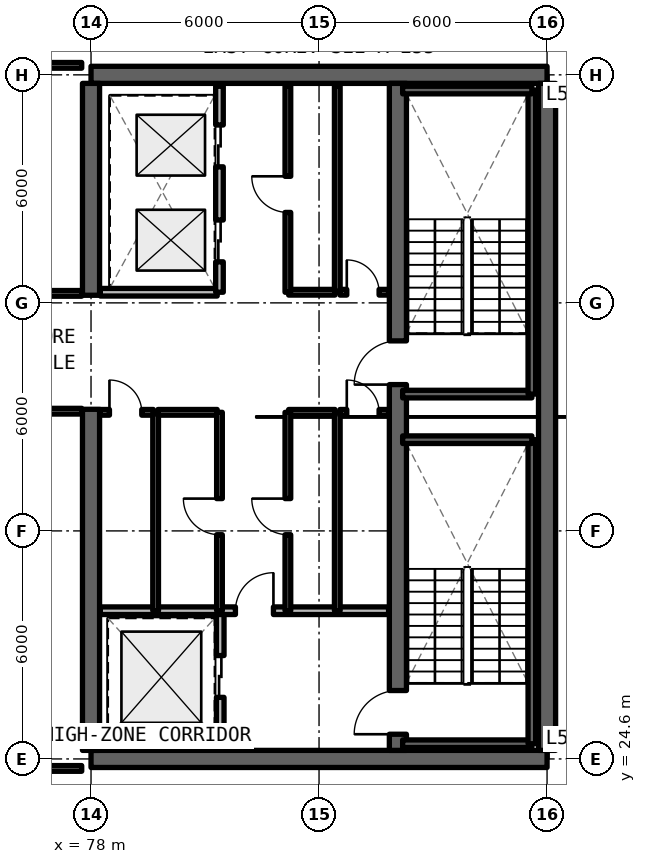
"""IFC4 building model, lengths in metres.
Left out: names, types, materials, properties, quantities, classifications, styles, units other than length and angle.
Written with IfcOpenShell. Run it as: python <this file> out.ifc"""

import sys

from ifc_helpers import new_model, si_unit, direction, frame, frame_2d, origin, place, context, subcontext, project, spatial, rectangle, extrude, element, fill, save


model = new_model("IFC4")
c1 = context("Model", 3, precision=1e-05, world=origin(), true_north=direction((0.0, 1.0)))
c2 = subcontext(c1, "Body", "Model", "MODEL_VIEW")
j1 = project(units=[si_unit("LENGTHUNIT", "METRE"), si_unit("PLANEANGLEUNIT", "RADIAN")], contexts=[c1])
p1 = place(None, origin())
s1 = spatial("IfcSite", under=j1, at=p1, CompositionType="ELEMENT")
p2 = place(p1, origin())
s2 = spatial("IfcBuilding", under=s1, at=p2, CompositionType="ELEMENT")
p3 = place(p2, frame((0.0, 0.0, 211.86)))
s3 = spatial("IfcBuildingStorey", under=s2, at=p3, CompositionType="ELEMENT", Elevation=211.86)
for number, where, z_axis, x_axis in (
    (1, (78.0, 24.6, 0.0), (0.0, 0.0, 1.0), (1.0, 0.0, 0.0)),
    (2, (90.0, 42.6, 0.0), (0.0, 0.0, 1.0), (-1.0, 0.0, 0.0)),
):
    element("IfcWall", number, at=place(p3, frame(where, z_axis=z_axis, x_axis=x_axis)), inside=s3, PredefinedType="SHEAR", context=c2, shape_type="SweptSolid", body=[
        extrude(rectangle(XDim=12.0, YDim=0.45, at=frame_2d((6.0, 0.0))), origin(), (0.0, 0.0, 1.0), 3.63),
    ])
p4 = place(p3, frame((90.0, 24.825, 0.0), z_axis=(0.0, 0.0, 1.0), x_axis=(0.0, 1.0, 0.0)))
e3 = element("IfcWall", 3, at=p4, inside=s3, PredefinedType="SHEAR", context=c2, shape_type="SweptSolid", body=[
    extrude(rectangle(XDim=17.55, YDim=0.45, at=frame_2d((8.775, 0.0))), origin(), (0.0, 0.0, 1.0), 3.63),
])
p5 = place(p3, frame((78.0, 24.825, 0.0), z_axis=(0.0, 0.0, 1.0), x_axis=(0.0, 1.0, 0.0)))
e4 = element("IfcWall", 4, at=p5, inside=s3, PredefinedType="SHEAR", context=c2, shape_type="SweptSolid", body=[
    extrude(rectangle(XDim=8.975, YDim=0.45, at=frame_2d((4.488, 0.0))), origin(), (0.0, 0.0, 1.0), 3.63),
])
p6 = place(p3, frame((78.0, 36.8, 0.0), z_axis=(0.0, 0.0, 1.0), x_axis=(0.0, 1.0, 0.0)))
e5 = element("IfcWall", 5, at=p6, inside=s3, PredefinedType="SHEAR", context=c2, shape_type="SweptSolid", body=[
    extrude(rectangle(XDim=5.575, YDim=0.45, at=frame_2d((2.788, 0.0))), origin(), (0.0, 0.0, 1.0), 3.63),
])
p7 = place(p3, frame((86.075, 24.825, 0.0), z_axis=(0.0, 0.0, 1.0), x_axis=(0.0, 1.0, 0.0)))
e6 = element("IfcWall", 6, at=p7, inside=s3, PredefinedType="SHEAR", context=c2, shape_type="SweptSolid", body=[
    extrude(rectangle(XDim=17.55, YDim=0.45, at=frame_2d((8.775, 0.0))), origin(), (0.0, 0.0, 1.0), 3.63),
])
p8 = place(p7, frame((0.425, 0.0, 0.0)))
e7 = element("IfcOpeningElement", 7, at=p8, cuts=e6, PredefinedType="OPENING", context=c2, shape_type="SweptSolid", body=[
    extrude(rectangle(XDim=1.15, YDim=2.15, at=frame_2d((0.575, 1.075))), frame((0.0, 0.235, 0.0), z_axis=(0.0, -1.0, 0.0), x_axis=(1.0, 0.0, 0.0)), (0.0, 0.0, 1.0), 0.47),
])
p9 = place(p7, frame((9.625, 0.0, 0.0)))
e8 = element("IfcOpeningElement", 8, at=p9, cuts=e6, PredefinedType="OPENING", context=c2, shape_type="SweptSolid", body=[
    extrude(rectangle(XDim=1.15, YDim=2.15, at=frame_2d((0.575, 1.075))), frame((0.0, 0.235, 0.0), z_axis=(0.0, -1.0, 0.0), x_axis=(1.0, 0.0, 0.0)), (0.0, 0.0, 1.0), 0.47),
])
p10 = place(p3, frame((81.4, 24.92, 0.0), z_axis=(0.0, 0.0, 1.0), x_axis=(0.0, 1.0, 0.0)))
e9 = element("IfcWall", 9, at=p10, inside=s3, PredefinedType="SOLIDWALL", context=c2, shape_type="SweptSolid", body=[
    extrude(rectangle(XDim=3.58, YDim=0.2, at=frame_2d((1.79, 0.0))), origin(), (0.0, 0.0, 1.0), 2.63),
])
p11 = place(p10, frame((1.3, 0.0, 0.0)))
e10 = element("IfcOpeningElement", 10, at=p11, cuts=e9, PredefinedType="OPENING", context=c2, shape_type="SweptSolid", body=[
    extrude(rectangle(XDim=1.1, YDim=2.2, at=frame_2d((0.55, 1.1))), frame((0.0, 0.11, 0.0), z_axis=(0.0, -1.0, 0.0), x_axis=(1.0, 0.0, 0.0)), (0.0, 0.0, 1.0), 0.22),
])
p12 = place(p3, frame((78.245, 28.5, 0.0), z_axis=(0.0, 0.0, 1.0), x_axis=(1.0, 0.0, 0.0)))
e11 = element("IfcWall", 11, at=p12, inside=s3, PredefinedType="SOLIDWALL", context=c2, shape_type="SweptSolid", body=[
    extrude(rectangle(XDim=7.585, YDim=0.2, at=frame_2d((3.792, 0.0))), origin(), (0.0, 0.0, 1.0), 2.63),
])
p13 = place(p12, frame((3.555, 0.0, 0.0)))
e12 = element("IfcOpeningElement", 12, at=p13, cuts=e11, PredefinedType="OPENING", context=c2, shape_type="SweptSolid", body=[
    extrude(rectangle(XDim=1.0, YDim=2.15, at=frame_2d((0.5, 1.075))), frame((0.0, 0.11, 0.0), z_axis=(0.0, -1.0, 0.0), x_axis=(1.0, 0.0, 0.0)), (0.0, 0.0, 1.0), 0.22),
])
p14 = place(p3, frame((84.48, 28.5, 0.0), z_axis=(0.0, 0.0, 1.0), x_axis=(0.0, 1.0, 0.0)))
e13 = element("IfcWall", 13, at=p14, inside=s3, PredefinedType="SOLIDWALL", context=c2, shape_type="SweptSolid", body=[
    extrude(rectangle(XDim=5.22, YDim=0.15, at=frame_2d((2.61, 0.0))), origin(), (0.0, 0.0, 1.0), 2.63),
])
p15 = place(p3, frame((84.55, 33.72, 0.0), z_axis=(0.0, 0.0, 1.0), x_axis=(1.0, 0.0, 0.0)))
e14 = element("IfcWall", 14, at=p15, inside=s3, PredefinedType="SOLIDWALL", context=c2, shape_type="SweptSolid", body=[
    extrude(rectangle(XDim=1.28, YDim=0.15, at=frame_2d((0.64, 0.0))), origin(), (0.0, 0.0, 1.0), 2.63),
])
p16 = place(p15, frame((0.18, 0.0, 0.0)))
e15 = element("IfcOpeningElement", 15, at=p16, cuts=e14, PredefinedType="OPENING", context=c2, shape_type="SweptSolid", body=[
    extrude(rectangle(XDim=0.85, YDim=2.1, at=frame_2d((0.425, 1.05))), frame((0.0, 0.085, 0.0), z_axis=(0.0, -1.0, 0.0), x_axis=(1.0, 0.0, 0.0)), (0.0, 0.0, 1.0), 0.17),
])
p17 = place(p3, frame((83.2, 33.72, 0.0), z_axis=(0.0, 0.0, 1.0), x_axis=(1.0, 0.0, 0.0)))
e16 = element("IfcWall", 16, at=p17, inside=s3, PredefinedType="SOLIDWALL", context=c2, shape_type="SweptSolid", body=[
    extrude(rectangle(XDim=1.22, YDim=0.15, at=frame_2d((0.61, 0.0))), origin(), (0.0, 0.0, 1.0), 2.63),
])
p18 = place(p3, frame((83.18, 28.5, 0.0), z_axis=(0.0, 0.0, 1.0), x_axis=(0.0, 1.0, 0.0)))
e17 = element("IfcWall", 17, at=p18, inside=s3, PredefinedType="SOLIDWALL", context=c2, shape_type="SweptSolid", body=[
    extrude(rectangle(XDim=5.22, YDim=0.15, at=frame_2d((2.61, 0.0))), origin(), (0.0, 0.0, 1.0), 2.63),
])
p19 = place(p18, frame((2.0, 0.0, 0.0)))
e18 = element("IfcOpeningElement", 18, at=p19, cuts=e17, PredefinedType="OPENING", context=c2, shape_type="SweptSolid", body=[
    extrude(rectangle(XDim=0.95, YDim=2.15, at=frame_2d((0.475, 1.075))), frame((0.0, 0.085, 0.0), z_axis=(0.0, -1.0, 0.0), x_axis=(1.0, 0.0, 0.0)), (0.0, 0.0, 1.0), 0.17),
])
p20 = place(p3, frame((79.7, 28.5, 0.0), z_axis=(0.0, 0.0, 1.0), x_axis=(0.0, 1.0, 0.0)))
e19 = element("IfcWall", 19, at=p20, inside=s3, PredefinedType="SOLIDWALL", context=c2, shape_type="SweptSolid", body=[
    extrude(rectangle(XDim=5.22, YDim=0.15, at=frame_2d((2.61, 0.0))), origin(), (0.0, 0.0, 1.0), 2.63),
])
p21 = place(p3, frame((79.76, 33.72, 0.0), z_axis=(0.0, 0.0, 1.0), x_axis=(1.0, 0.0, 0.0)))
e20 = element("IfcWall", 20, at=p21, inside=s3, PredefinedType="SOLIDWALL", context=c2, shape_type="SweptSolid", body=[
    extrude(rectangle(XDim=1.56, YDim=0.15, at=frame_2d((0.78, 0.0))), origin(), (0.0, 0.0, 1.0), 2.63),
])
p22 = place(p3, frame((78.245, 33.72, 0.0), z_axis=(0.0, 0.0, 1.0), x_axis=(1.0, 0.0, 0.0)))
e21 = element("IfcWall", 21, at=p22, inside=s3, PredefinedType="SOLIDWALL", context=c2, shape_type="SweptSolid", body=[
    extrude(rectangle(XDim=1.395, YDim=0.15, at=frame_2d((0.697, 0.0))), origin(), (0.0, 0.0, 1.0), 2.63),
])
p23 = place(p22, frame((0.24, 0.0, 0.0)))
e22 = element("IfcOpeningElement", 22, at=p23, cuts=e21, PredefinedType="OPENING", context=c2, shape_type="SweptSolid", body=[
    extrude(rectangle(XDim=0.85, YDim=2.1, at=frame_2d((0.425, 1.05))), frame((0.0, 0.085, 0.0), z_axis=(0.0, -1.0, 0.0), x_axis=(1.0, 0.0, 0.0)), (0.0, 0.0, 1.0), 0.17),
])
p24 = place(p3, frame((81.38, 28.5, 0.0), z_axis=(0.0, 0.0, 1.0), x_axis=(0.0, 1.0, 0.0)))
e23 = element("IfcWall", 23, at=p24, inside=s3, PredefinedType="SOLIDWALL", context=c2, shape_type="SweptSolid", body=[
    extrude(rectangle(XDim=5.22, YDim=0.15, at=frame_2d((2.61, 0.0))), origin(), (0.0, 0.0, 1.0), 2.63),
])
p25 = place(p24, frame((2.0, 0.0, 0.0)))
e24 = element("IfcOpeningElement", 24, at=p25, cuts=e23, PredefinedType="OPENING", context=c2, shape_type="SweptSolid", body=[
    extrude(rectangle(XDim=0.95, YDim=2.15, at=frame_2d((0.475, 1.075))), frame((0.0, 0.085, 0.0), z_axis=(0.0, -1.0, 0.0), x_axis=(1.0, 0.0, 0.0)), (0.0, 0.0, 1.0), 0.17),
])
p26 = place(p3, frame((84.48, 36.88, 0.0), z_axis=(0.0, 0.0, 1.0), x_axis=(0.0, 1.0, 0.0)))
e25 = element("IfcWall", 25, at=p26, inside=s3, PredefinedType="SOLIDWALL", context=c2, shape_type="SweptSolid", body=[
    extrude(rectangle(XDim=5.42, YDim=0.15, at=frame_2d((2.71, 0.0))), origin(), (0.0, 0.0, 1.0), 2.63),
])
p27 = place(p3, frame((84.55, 36.88, 0.0), z_axis=(0.0, 0.0, 1.0), x_axis=(1.0, 0.0, 0.0)))
e26 = element("IfcWall", 26, at=p27, inside=s3, PredefinedType="SOLIDWALL", context=c2, shape_type="SweptSolid", body=[
    extrude(rectangle(XDim=1.28, YDim=0.15, at=frame_2d((0.64, 0.0))), origin(), (0.0, 0.0, 1.0), 2.63),
])
p28 = place(p27, frame((0.18, 0.0, 0.0)))
e27 = element("IfcOpeningElement", 27, at=p28, cuts=e26, PredefinedType="OPENING", context=c2, shape_type="SweptSolid", body=[
    extrude(rectangle(XDim=0.85, YDim=2.1, at=frame_2d((0.425, 1.05))), frame((0.0, 0.085, 0.0), z_axis=(0.0, -1.0, 0.0), x_axis=(1.0, 0.0, 0.0)), (0.0, 0.0, 1.0), 0.17),
])
p29 = place(p3, frame((83.2, 36.88, 0.0), z_axis=(0.0, 0.0, 1.0), x_axis=(1.0, 0.0, 0.0)))
e28 = element("IfcWall", 28, at=p29, inside=s3, PredefinedType="SOLIDWALL", context=c2, shape_type="SweptSolid", body=[
    extrude(rectangle(XDim=1.22, YDim=0.15, at=frame_2d((0.61, 0.0))), origin(), (0.0, 0.0, 1.0), 2.63),
])
p30 = place(p3, frame((83.18, 36.88, 0.0), z_axis=(0.0, 0.0, 1.0), x_axis=(0.0, 1.0, 0.0)))
e29 = element("IfcWall", 29, at=p30, inside=s3, PredefinedType="SOLIDWALL", context=c2, shape_type="SweptSolid", body=[
    extrude(rectangle(XDim=5.42, YDim=0.15, at=frame_2d((2.71, 0.0))), origin(), (0.0, 0.0, 1.0), 2.63),
])
p31 = place(p30, frame((2.1, 0.0, 0.0)))
e30 = element("IfcOpeningElement", 30, at=p31, cuts=e29, PredefinedType="OPENING", context=c2, shape_type="SweptSolid", body=[
    extrude(rectangle(XDim=0.95, YDim=2.15, at=frame_2d((0.475, 1.075))), frame((0.0, 0.085, 0.0), z_axis=(0.0, -1.0, 0.0), x_axis=(1.0, 0.0, 0.0)), (0.0, 0.0, 1.0), 0.17),
])
p32 = place(p3, frame((78.245, 36.88, 0.0), z_axis=(0.0, 0.0, 1.0), x_axis=(1.0, 0.0, 0.0)))
e31 = element("IfcWall", 31, at=p32, inside=s3, PredefinedType="SOLIDWALL", context=c2, shape_type="SweptSolid", body=[
    extrude(rectangle(XDim=3.075, YDim=0.2, at=frame_2d((1.538, 0.0))), origin(), (0.0, 0.0, 1.0), 2.63),
])
p33 = place(p3, frame((81.38, 36.88, 0.0), z_axis=(0.0, 0.0, 1.0), x_axis=(0.0, 1.0, 0.0)))
e32 = element("IfcWall", 32, at=p33, inside=s3, PredefinedType="SOLIDWALL", context=c2, shape_type="SweptSolid", body=[
    extrude(rectangle(XDim=5.42, YDim=0.2, at=frame_2d((2.71, 0.0))), origin(), (0.0, 0.0, 1.0), 2.63),
])
p34 = place(p33, frame((0.8, 0.0, 0.0)))
e33 = element("IfcOpeningElement", 33, at=p34, cuts=e32, PredefinedType="OPENING", context=c2, shape_type="SweptSolid", body=[
    extrude(rectangle(XDim=1.1, YDim=2.2, at=frame_2d((0.55, 1.1))), frame((0.0, 0.11, 0.0), z_axis=(0.0, -1.0, 0.0), x_axis=(1.0, 0.0, 0.0)), (0.0, 0.0, 1.0), 0.22),
])
p35 = place(p33, frame((3.3, 0.0, 0.0)))
e34 = element("IfcOpeningElement", 34, at=p35, cuts=e32, PredefinedType="OPENING", context=c2, shape_type="SweptSolid", body=[
    extrude(rectangle(XDim=1.1, YDim=2.2, at=frame_2d((0.55, 1.1))), frame((0.0, 0.11, 0.0), z_axis=(0.0, -1.0, 0.0), x_axis=(1.0, 0.0, 0.0)), (0.0, 0.0, 1.0), 0.22),
])
p36 = place(p3, frame((69.85, 24.35, 0.0), z_axis=(0.0, 0.0, 1.0), x_axis=(1.0, 0.0, 0.0)))
e35 = element("IfcWall", 35, at=p36, inside=s3, PredefinedType="SOLIDWALL", context=c2, shape_type="SweptSolid", body=[
    extrude(rectangle(XDim=7.905, YDim=0.15, at=frame_2d((3.952, 0.0))), origin(), (0.0, 0.0, 1.0), 2.63),
])
p37 = place(p3, frame((69.85, 33.75, 0.0), z_axis=(0.0, 0.0, 1.0), x_axis=(1.0, 0.0, 0.0)))
e36 = element("IfcWall", 36, at=p37, inside=s3, PredefinedType="SOLIDWALL", context=c2, shape_type="SweptSolid", body=[
    extrude(rectangle(XDim=7.905, YDim=0.15, at=frame_2d((3.952, 0.0))), origin(), (0.0, 0.0, 1.0), 2.63),
])
p38 = place(p37, frame((3.478, 0.0, 0.0)))
e37 = element("IfcOpeningElement", 37, at=p38, cuts=e36, PredefinedType="OPENING", context=c2, shape_type="SweptSolid", body=[
    extrude(rectangle(XDim=0.95, YDim=2.15, at=frame_2d((0.475, 1.075))), frame((0.0, 0.085, 0.0), z_axis=(0.0, -1.0, 0.0), x_axis=(1.0, 0.0, 0.0)), (0.0, 0.0, 1.0), 0.17),
])
p39 = place(p3, frame((69.85, 36.85, 0.0), z_axis=(0.0, 0.0, 1.0), x_axis=(1.0, 0.0, 0.0)))
e38 = element("IfcWall", 38, at=p39, inside=s3, PredefinedType="SOLIDWALL", context=c2, shape_type="SweptSolid", body=[
    extrude(rectangle(XDim=7.905, YDim=0.15, at=frame_2d((3.952, 0.0))), origin(), (0.0, 0.0, 1.0), 2.63),
])
p40 = place(p39, frame((3.478, 0.0, 0.0)))
e39 = element("IfcOpeningElement", 39, at=p40, cuts=e38, PredefinedType="OPENING", context=c2, shape_type="SweptSolid", body=[
    extrude(rectangle(XDim=0.95, YDim=2.15, at=frame_2d((0.475, 1.075))), frame((0.0, 0.085, 0.0), z_axis=(0.0, -1.0, 0.0), x_axis=(1.0, 0.0, 0.0)), (0.0, 0.0, 1.0), 0.17),
])
p41 = place(p3, frame((69.85, 42.85, 0.0), z_axis=(0.0, 0.0, 1.0), x_axis=(1.0, 0.0, 0.0)))
e40 = element("IfcWall", 40, at=p41, inside=s3, PredefinedType="SOLIDWALL", context=c2, shape_type="SweptSolid", body=[
    extrude(rectangle(XDim=7.905, YDim=0.15, at=frame_2d((3.952, 0.0))), origin(), (0.0, 0.0, 1.0), 2.63),
])
p42 = place(p3, frame((86.2, 25.0, 0.0), z_axis=(0.0, 0.0, 1.0), x_axis=(1.0, 0.0, 0.0)))
e41 = element("IfcWall", 41, at=p42, inside=s3, PredefinedType="SOLIDWALL", context=c2, shape_type="SweptSolid", body=[
    extrude(rectangle(XDim=3.4, YDim=0.2, at=frame_2d((1.7, 0.0))), origin(), (0.0, 0.0, 1.0), 3.63),
])
p43 = place(p3, frame((89.6, 25.0, 0.0), z_axis=(0.0, 0.0, 1.0), x_axis=(0.0, 1.0, 0.0)))
e42 = element("IfcWall", 42, at=p43, inside=s3, PredefinedType="SOLIDWALL", context=c2, shape_type="SweptSolid", body=[
    extrude(rectangle(XDim=8.0, YDim=0.2, at=frame_2d((4.0, 0.0))), origin(), (0.0, 0.0, 1.0), 3.63),
])
for number, where, z_axis, x_axis in (
    (43, (89.6, 33.0, 0.0), (0.0, 0.0, 1.0), (-1.0, 0.0, 0.0)),
    (44, (86.2, 34.2, 0.0), (0.0, 0.0, 1.0), (1.0, 0.0, 0.0)),
):
    element("IfcWall", number, at=place(p3, frame(where, z_axis=z_axis, x_axis=x_axis)), inside=s3, PredefinedType="SOLIDWALL", context=c2, shape_type="SweptSolid", body=[
        extrude(rectangle(XDim=3.4, YDim=0.2, at=frame_2d((1.7, 0.0))), origin(), (0.0, 0.0, 1.0), 3.63),
    ])
p44 = place(p3, frame((89.6, 34.2, 0.0), z_axis=(0.0, 0.0, 1.0), x_axis=(0.0, 1.0, 0.0)))
e45 = element("IfcWall", 45, at=p44, inside=s3, PredefinedType="SOLIDWALL", context=c2, shape_type="SweptSolid", body=[
    extrude(rectangle(XDim=8.0, YDim=0.2, at=frame_2d((4.0, 0.0))), origin(), (0.0, 0.0, 1.0), 3.63),
])
p45 = place(p3, frame((89.6, 42.2, 0.0), z_axis=(0.0, 0.0, 1.0), x_axis=(-1.0, 0.0, 0.0)))
e46 = element("IfcWall", 46, at=p45, inside=s3, PredefinedType="SOLIDWALL", context=c2, shape_type="SweptSolid", body=[
    extrude(rectangle(XDim=3.4, YDim=0.2, at=frame_2d((1.7, 0.0))), origin(), (0.0, 0.0, 1.0), 3.63),
])
p46 = place(p11, origin())
e47 = element("IfcDoor", 47, at=p46, inside=s3, OperationType="SLIDING_TO_LEFT", PredefinedType="DOOR", context=c2, shape_type="SweptSolid", body=[
    extrude(rectangle(XDim=1.1, YDim=2.2, at=frame_2d((0.55, 1.1))), frame((0.0, 0.025, 0.0), z_axis=(0.0, -1.0, 0.0), x_axis=(1.0, 0.0, 0.0)), (0.0, 0.0, 1.0), 0.05),
])
fill(e10, e47)
p47 = place(p13, origin())
e48 = element("IfcDoor", 48, at=p47, inside=s3, OperationType="SINGLE_SWING_RIGHT", PredefinedType="DOOR", context=c2, shape_type="SweptSolid", body=[
    extrude(rectangle(XDim=1.0, YDim=2.15, at=frame_2d((0.5, 1.075))), frame((0.0, 0.025, 0.0), z_axis=(0.0, -1.0, 0.0), x_axis=(1.0, 0.0, 0.0)), (0.0, 0.0, 1.0), 0.05),
])
fill(e12, e48)
p48 = place(p16, origin())
e49 = element("IfcDoor", 49, at=p48, inside=s3, OperationType="SINGLE_SWING_LEFT", PredefinedType="DOOR", context=c2, shape_type="SweptSolid", body=[
    extrude(rectangle(XDim=0.85, YDim=2.1, at=frame_2d((0.425, 1.05))), frame((0.0, 0.025, 0.0), z_axis=(0.0, -1.0, 0.0), x_axis=(1.0, 0.0, 0.0)), (0.0, 0.0, 1.0), 0.05),
])
fill(e15, e49)
p49 = place(p19, origin())
e50 = element("IfcDoor", 50, at=p49, inside=s3, OperationType="SINGLE_SWING_RIGHT", PredefinedType="DOOR", context=c2, shape_type="SweptSolid", body=[
    extrude(rectangle(XDim=0.95, YDim=2.15, at=frame_2d((0.475, 1.075))), frame((0.0, 0.025, 0.0), z_axis=(0.0, -1.0, 0.0), x_axis=(1.0, 0.0, 0.0)), (0.0, 0.0, 1.0), 0.05),
])
fill(e18, e50)
p50 = place(p23, origin())
e51 = element("IfcDoor", 51, at=p50, inside=s3, OperationType="SINGLE_SWING_LEFT", PredefinedType="DOOR", context=c2, shape_type="SweptSolid", body=[
    extrude(rectangle(XDim=0.85, YDim=2.1, at=frame_2d((0.425, 1.05))), frame((0.0, 0.025, 0.0), z_axis=(0.0, -1.0, 0.0), x_axis=(1.0, 0.0, 0.0)), (0.0, 0.0, 1.0), 0.05),
])
fill(e22, e51)
p51 = place(p25, origin())
e52 = element("IfcDoor", 52, at=p51, inside=s3, OperationType="SINGLE_SWING_RIGHT", PredefinedType="DOOR", context=c2, shape_type="SweptSolid", body=[
    extrude(rectangle(XDim=0.95, YDim=2.15, at=frame_2d((0.475, 1.075))), frame((0.0, 0.025, 0.0), z_axis=(0.0, -1.0, 0.0), x_axis=(1.0, 0.0, 0.0)), (0.0, 0.0, 1.0), 0.05),
])
fill(e24, e52)
p52 = place(p28, origin())
e53 = element("IfcDoor", 53, at=p52, inside=s3, OperationType="SINGLE_SWING_LEFT", PredefinedType="DOOR", context=c2, shape_type="SweptSolid", body=[
    extrude(rectangle(XDim=0.85, YDim=2.1, at=frame_2d((0.425, 1.05))), frame((0.0, 0.025, 0.0), z_axis=(0.0, -1.0, 0.0), x_axis=(1.0, 0.0, 0.0)), (0.0, 0.0, 1.0), 0.05),
])
fill(e27, e53)
p53 = place(p31, origin())
e54 = element("IfcDoor", 54, at=p53, inside=s3, OperationType="SINGLE_SWING_RIGHT", PredefinedType="DOOR", context=c2, shape_type="SweptSolid", body=[
    extrude(rectangle(XDim=0.95, YDim=2.15, at=frame_2d((0.475, 1.075))), frame((0.0, 0.025, 0.0), z_axis=(0.0, -1.0, 0.0), x_axis=(1.0, 0.0, 0.0)), (0.0, 0.0, 1.0), 0.05),
])
fill(e30, e54)
p54 = place(p34, origin())
e55 = element("IfcDoor", 55, at=p54, inside=s3, OperationType="SLIDING_TO_LEFT", PredefinedType="DOOR", context=c2, shape_type="SweptSolid", body=[
    extrude(rectangle(XDim=1.1, YDim=2.2, at=frame_2d((0.55, 1.1))), frame((0.0, 0.025, 0.0), z_axis=(0.0, -1.0, 0.0), x_axis=(1.0, 0.0, 0.0)), (0.0, 0.0, 1.0), 0.05),
])
fill(e33, e55)
p55 = place(p35, origin())
e56 = element("IfcDoor", 56, at=p55, inside=s3, OperationType="SLIDING_TO_RIGHT", PredefinedType="DOOR", context=c2, shape_type="SweptSolid", body=[
    extrude(rectangle(XDim=1.1, YDim=2.2, at=frame_2d((0.55, 1.1))), frame((0.0, 0.025, 0.0), z_axis=(0.0, -1.0, 0.0), x_axis=(1.0, 0.0, 0.0)), (0.0, 0.0, 1.0), 0.05),
])
fill(e34, e56)
p56 = place(p8, origin())
e57 = element("IfcDoor", 57, at=p56, inside=s3, OperationType="SINGLE_SWING_RIGHT", PredefinedType="DOOR", context=c2, shape_type="SweptSolid", body=[
    extrude(rectangle(XDim=1.15, YDim=2.15, at=frame_2d((0.575, 1.075))), frame((0.0, 0.025, 0.0), z_axis=(0.0, -1.0, 0.0), x_axis=(1.0, 0.0, 0.0)), (0.0, 0.0, 1.0), 0.05),
])
fill(e7, e57)
p57 = place(p9, origin())
e58 = element("IfcDoor", 58, at=p57, inside=s3, OperationType="SINGLE_SWING_LEFT", PredefinedType="DOOR", context=c2, shape_type="SweptSolid", body=[
    extrude(rectangle(XDim=1.15, YDim=2.15, at=frame_2d((0.575, 1.075))), frame((0.0, 0.025, 0.0), z_axis=(0.0, -1.0, 0.0), x_axis=(1.0, 0.0, 0.0)), (0.0, 0.0, 1.0), 0.05),
])
fill(e8, e58)
save(model, sys.argv[1])
